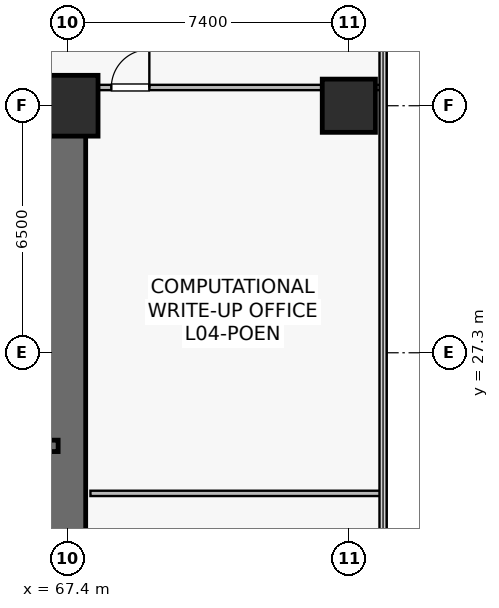
"""IFC4 building model, lengths in metres.
Left out: names, types, materials, properties, quantities, classifications, styles, units other than length and angle.
Written with IfcOpenShell. Run it as: python <this file> out.ifc"""

import sys

from ifc_helpers import new_model, si_unit, direction, frame, frame_2d, origin, origin_2d, place, context, subcontext, project, spatial, rectangle, extrude, source, transform, mapped, element, fill, save


model = new_model("IFC4")
c1 = context("Model", 3, precision=1e-05, world=origin(), true_north=direction((0.0, 1.0)))
c2 = subcontext(c1, "Body", "Model", "MODEL_VIEW")
j1 = project(units=[si_unit("LENGTHUNIT", "METRE"), si_unit("PLANEANGLEUNIT", "RADIAN")], contexts=[c1])
p1 = place(None, origin())
s1 = spatial("IfcSite", under=j1, at=p1, CompositionType="ELEMENT")
p2 = place(p1, origin())
s2 = spatial("IfcBuilding", under=s1, at=p2, CompositionType="ELEMENT")
p3 = place(p2, frame((0.0, 0.0, 15.0)))
s3 = spatial("IfcBuildingStorey", under=s2, at=p3, CompositionType="ELEMENT", Elevation=15.0)
p4 = place(p3, frame((52.125, 33.8, 0.0), z_axis=(0.0, 0.0, 1.0), x_axis=(1.0, 0.0, 0.0)))
e1 = element("IfcWall", 1, at=p4, inside=s3, PredefinedType="SHEAR", context=c2, shape_type="SweptSolid", body=[
    extrude(rectangle(XDim=15.75, YDim=0.95, at=frame_2d((7.875, 0.0))), origin(), (0.0, 0.0, 1.0), 4.45),
])
p5 = place(p4, frame((9.4, 0.0, 0.0)))
e2 = element("IfcOpeningElement", 2, at=p5, cuts=e1, PredefinedType="OPENING", context=c2, shape_type="SweptSolid", body=[
    extrude(rectangle(XDim=0.95, YDim=2.15, at=frame_2d((0.475, 1.075))), frame((0.0, 0.485, 0.0), z_axis=(0.0, -1.0, 0.0), x_axis=(1.0, 0.0, 0.0)), (0.0, 0.0, 1.0), 0.97),
])
p6 = place(p4, frame((6.885, 0.0, 0.0)))
e3 = element("IfcOpeningElement", 3, at=p6, cuts=e1, PredefinedType="OPENING", context=c2, shape_type="SweptSolid", body=[
    extrude(rectangle(XDim=0.95, YDim=2.15, at=frame_2d((0.475, 1.075))), frame((0.0, 0.485, 0.0), z_axis=(0.0, -1.0, 0.0), x_axis=(1.0, 0.0, 0.0)), (0.0, 0.0, 1.0), 0.97),
])
p7 = place(p4, frame((4.335, 0.0, 0.0)))
e4 = element("IfcOpeningElement", 4, at=p7, cuts=e1, PredefinedType="OPENING", context=c2, shape_type="SweptSolid", body=[
    extrude(rectangle(XDim=0.95, YDim=2.15, at=frame_2d((0.475, 1.075))), frame((0.0, 0.485, 0.0), z_axis=(0.0, -1.0, 0.0), x_axis=(1.0, 0.0, 0.0)), (0.0, 0.0, 1.0), 0.97),
])
p8 = place(p4, frame((1.785, 0.0, 0.0)))
e5 = element("IfcOpeningElement", 5, at=p8, cuts=e1, PredefinedType="OPENING", context=c2, shape_type="SweptSolid", body=[
    extrude(rectangle(XDim=0.95, YDim=2.15, at=frame_2d((0.475, 1.075))), frame((0.0, 0.485, 0.0), z_axis=(0.0, -1.0, 0.0), x_axis=(1.0, 0.0, 0.0)), (0.0, 0.0, 1.0), 0.97),
])
p9 = place(p3, frame((67.4, 15.275, 0.0), z_axis=(0.0, 0.0, 1.0), x_axis=(0.0, 1.0, 0.0)))
e6 = element("IfcWall", 6, at=p9, inside=s3, PredefinedType="SHEAR", context=c2, shape_type="SweptSolid", body=[
    extrude(rectangle(XDim=18.05, YDim=0.95, at=frame_2d((9.025, 0.0))), origin(), (0.0, 0.0, 1.0), 4.45),
])
p10 = place(p3, frame((63.35, 24.85, 0.0), z_axis=(0.0, 0.0, 1.0), x_axis=(1.0, 0.0, 0.0)))
e7 = element("IfcWall", 7, at=p10, inside=s3, PredefinedType="SHEAR", context=c2, shape_type="SweptSolid", body=[
    extrude(rectangle(XDim=3.8, YDim=0.3, at=frame_2d((1.9, 0.0))), origin(), (0.0, 0.0, 1.0), 4.45),
])
m1 = source(origin(), c2, "Body", "SweptSolid", [
    extrude(rectangle(XDim=1.6, YDim=1.6, at=origin_2d()), origin(), (0.0, 0.0, 1.0), 4.8),
])
p11 = place(p3, frame((67.4, 33.8, 0.0), z_axis=(0.0, 0.0, 1.0), x_axis=(1.0, 0.0, 0.0)))
e8 = element("IfcColumn", 8, at=p11, inside=s3, PredefinedType="COLUMN", context=c2, shape_type="MappedRepresentation", body=[
    mapped(m1, transform((0.0, 0.0, 0.0), scale=1.0)),
])
m2 = source(origin(), c2, "Body", "SweptSolid", [
    extrude(rectangle(XDim=1.4, YDim=1.4, at=origin_2d()), origin(), (0.0, 0.0, 1.0), 4.8),
])
p12 = place(p3, frame((74.8, 33.8, 0.0), z_axis=(0.0, 0.0, 1.0), x_axis=(1.0, 0.0, 0.0)))
e9 = element("IfcColumn", 9, at=p12, inside=s3, PredefinedType="COLUMN", context=c2, shape_type="MappedRepresentation", body=[
    mapped(m2, transform((0.0, 0.0, 0.0), scale=1.0)),
])
p13 = place(p3, frame((68.0, 23.6, 0.0), z_axis=(0.0, 0.0, 1.0), x_axis=(1.0, 0.0, 0.0)))
e10 = element("IfcWall", 10, at=p13, inside=s3, PredefinedType="PARTITIONING", context=c2, shape_type="SweptSolid", body=[
    extrude(rectangle(XDim=7.65, YDim=0.14, at=frame_2d((3.825, 0.0))), origin(), (0.0, 0.0, 1.0), 3.835),
])
p14 = place(p3, frame((68.0, 34.28, 0.0), z_axis=(0.0, 0.0, 1.0), x_axis=(1.0, 0.0, 0.0)))
e11 = element("IfcWall", 11, at=p14, inside=s3, PredefinedType="PARTITIONING", context=c2, shape_type="SweptSolid", body=[
    extrude(rectangle(XDim=7.65, YDim=0.14, at=frame_2d((3.825, 0.0))), origin(), (0.0, 0.0, 1.0), 3.835),
])
p15 = place(p14, frame((0.55, 0.0, 0.0)))
e12 = element("IfcOpeningElement", 12, at=p15, cuts=e11, PredefinedType="OPENING", context=c2, shape_type="SweptSolid", body=[
    extrude(rectangle(XDim=1.0, YDim=2.15, at=frame_2d((0.5, 1.075))), frame((0.0, 0.08, 0.0), z_axis=(0.0, -1.0, 0.0), x_axis=(1.0, 0.0, 0.0)), (0.0, 0.0, 1.0), 0.16),
])
m3 = source(origin(), c2, "Body", "SweptSolid", [
    extrude(rectangle(XDim=1.0, YDim=2.15, at=frame_2d((0.5, 1.075))), frame((0.0, 0.025, 0.0), z_axis=(0.0, -1.0, 0.0), x_axis=(1.0, 0.0, 0.0)), (0.0, 0.0, 1.0), 0.05),
])
p16 = place(p15, origin())
e13 = element("IfcDoor", 13, at=p16, inside=s3, OperationType="SINGLE_SWING_RIGHT", PredefinedType="DOOR", context=c2, shape_type="MappedRepresentation", body=[
    mapped(m3, transform((0.0, 0.0, 0.0), scale=1.0)),
])
fill(e12, e13)
save(model, sys.argv[1])
